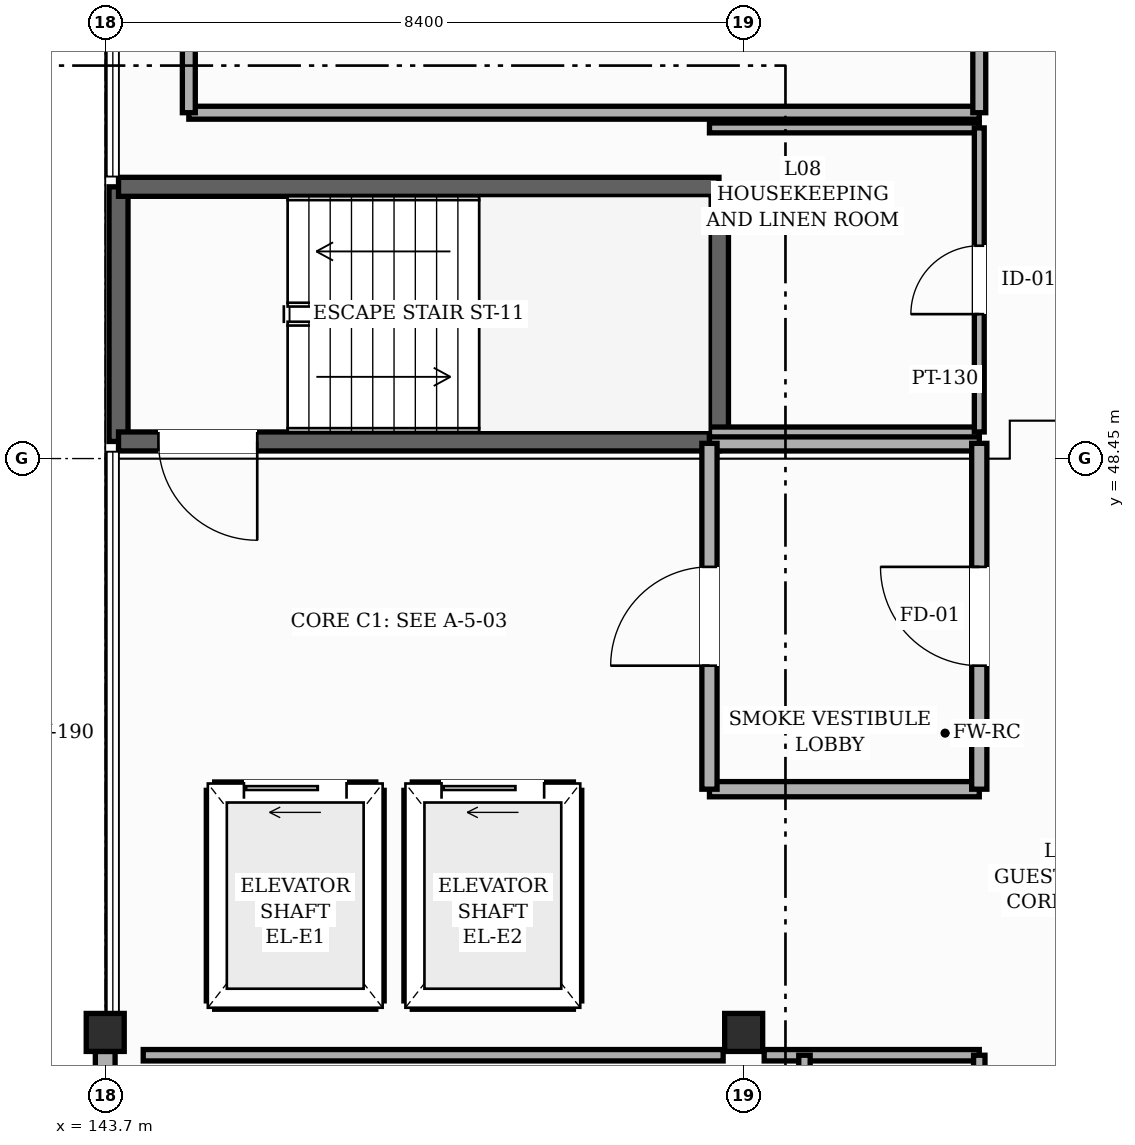
"""IFC4 building model, lengths in metres.
Left out: names, types, materials, properties, quantities, classifications, styles, units other than length and angle.
Written with IfcOpenShell. Run it as: python <this file> out.ifc"""

import sys

from ifc_helpers import new_model, si_unit, direction, frame, frame_2d, origin, origin_2d, place, context, subcontext, project, spatial, rectangle, hollow_rectangle, extrude, element, fill, save


model = new_model("IFC4")
c1 = context("Model", 3, precision=1e-05, world=origin(), true_north=direction((0.0, 1.0)))
c2 = subcontext(c1, "Body", "Model", "MODEL_VIEW")
j1 = project(units=[si_unit("LENGTHUNIT", "METRE"), si_unit("PLANEANGLEUNIT", "RADIAN")], contexts=[c1])
p1 = place(None, origin())
s1 = spatial("IfcSite", under=j1, at=p1, CompositionType="ELEMENT")
p2 = place(p1, origin())
s2 = spatial("IfcBuilding", under=s1, at=p2, CompositionType="ELEMENT")
p3 = place(p2, frame((0.0, 0.0, 35.4)))
s3 = spatial("IfcBuildingStorey", under=s2, at=p3, CompositionType="ELEMENT", Elevation=35.4)
for number, where, z_axis, x_axis in (
    (1, (143.7, 40.9, 0.0), (0.0, 0.0, 1.0), (1.0, 0.0, 0.0)),
    (2, (152.1, 40.9, 0.0), (0.0, 0.0, 1.0), (1.0, 0.0, 0.0)),
):
    element("IfcColumn", number, at=place(p3, frame(where, z_axis=z_axis, x_axis=x_axis)), inside=s3, PredefinedType="COLUMN", context=c2, shape_type="SweptSolid", body=[
        extrude(hollow_rectangle(XDim=0.5, YDim=0.5, WallThickness=0.022, InnerFilletRadius=0.022, OuterFilletRadius=0.044, at=origin_2d()), origin(), (0.0, 0.0, 1.0), 3.6),
    ])
p4 = place(p3, frame((143.7, 32.25, 0.0), z_axis=(0.0, 0.0, 1.0), x_axis=(0.0, 1.0, 0.0)))
e3 = element("IfcWall", 3, at=p4, inside=s3, PredefinedType="SOLIDWALL", context=c2, shape_type="SweptSolid", body=[
    extrude(rectangle(XDim=8.4, YDim=0.26, at=frame_2d((4.2, 0.0))), origin(), (0.0, 0.0, 1.0), 2.655),
])
p5 = place(p4, frame((1.05, 0.0, 0.85)))
e4 = element("IfcOpeningElement", 4, at=p5, cuts=e3, PredefinedType="OPENING", context=c2, shape_type="SweptSolid", body=[
    extrude(rectangle(XDim=1.85, YDim=1.35, at=frame_2d((0.925, 0.675))), frame((0.0, 0.14, 0.0), z_axis=(0.0, -1.0, 0.0), x_axis=(1.0, 0.0, 0.0)), (0.0, 0.0, 1.0), 0.28),
])
p6 = place(p4, frame((3.475, 0.0, 0.85)))
e5 = element("IfcOpeningElement", 5, at=p6, cuts=e3, PredefinedType="OPENING", context=c2, shape_type="SweptSolid", body=[
    extrude(rectangle(XDim=2.1, YDim=1.35, at=frame_2d((1.05, 0.675))), frame((0.0, 0.14, 0.0), z_axis=(0.0, -1.0, 0.0), x_axis=(1.0, 0.0, 0.0)), (0.0, 0.0, 1.0), 0.28),
])
p7 = place(p4, frame((6.5, 0.0, 0.85)))
e6 = element("IfcOpeningElement", 6, at=p7, cuts=e3, PredefinedType="OPENING", context=c2, shape_type="SweptSolid", body=[
    extrude(rectangle(XDim=1.15, YDim=1.35, at=frame_2d((0.575, 0.675))), frame((0.0, 0.14, 0.0), z_axis=(0.0, -1.0, 0.0), x_axis=(1.0, 0.0, 0.0)), (0.0, 0.0, 1.0), 0.28),
])
for number, where, z_axis, x_axis in (
    (7, (143.875, 48.675, 0.0), (0.0, 0.0, 1.0), (0.0, 1.0, 0.0)),
    (8, (151.775, 52.025, 0.0), (0.0, 0.0, 1.0), (0.0, -1.0, 0.0)),
):
    element("IfcWall", number, at=place(p3, frame(where, z_axis=z_axis, x_axis=x_axis)), inside=s3, PredefinedType="SHEAR", context=c2, shape_type="SweptSolid", body=[
        extrude(rectangle(XDim=3.35, YDim=0.25, at=frame_2d((1.675, 0.0))), origin(), (0.0, 0.0, 1.0), 3.38),
    ])
p8 = place(p3, frame((151.775, 48.675, 0.0), z_axis=(0.0, 0.0, 1.0), x_axis=(-1.0, 0.0, 0.0)))
e9 = element("IfcWall", 9, at=p8, inside=s3, PredefinedType="SHEAR", context=c2, shape_type="SweptSolid", body=[
    extrude(rectangle(XDim=7.9, YDim=0.25, at=frame_2d((3.95, 0.0))), origin(), (0.0, 0.0, 1.0), 3.38),
])
p9 = place(p8, frame((6.075, 0.0, 0.0)))
e10 = element("IfcOpeningElement", 10, at=p9, cuts=e9, PredefinedType="OPENING", context=c2, shape_type="SweptSolid", body=[
    extrude(rectangle(XDim=1.3, YDim=2.2, at=frame_2d((0.65, 1.1))), frame((0.0, 0.135, 0.0), z_axis=(0.0, -1.0, 0.0), x_axis=(1.0, 0.0, 0.0)), (0.0, 0.0, 1.0), 0.27),
])
p10 = place(p3, frame((143.875, 52.025, 0.0), z_axis=(0.0, 0.0, 1.0), x_axis=(1.0, 0.0, 0.0)))
e11 = element("IfcWall", 11, at=p10, inside=s3, PredefinedType="SHEAR", context=c2, shape_type="SweptSolid", body=[
    extrude(rectangle(XDim=7.9, YDim=0.25, at=frame_2d((3.95, 0.0))), origin(), (0.0, 0.0, 1.0), 3.38),
])
p11 = place(p3, frame((145.14, 44.085, 0.0), z_axis=(0.0, 0.0, 1.0), x_axis=(1.0, 0.0, 0.0)))
e12 = element("IfcWall", 12, at=p11, inside=s3, PredefinedType="SHEAR", context=c2, shape_type="SweptSolid", body=[
    extrude(rectangle(XDim=2.12, YDim=0.22, at=frame_2d((1.06, 0.0))), origin(), (0.0, 0.0, 1.0), 3.38),
])
p12 = place(p11, frame((0.385, 0.0, 0.0)))
e13 = element("IfcOpeningElement", 13, at=p12, cuts=e12, PredefinedType="OPENING", context=c2, shape_type="SweptSolid", body=[
    extrude(rectangle(XDim=1.35, YDim=2.3, at=frame_2d((0.675, 1.15))), frame((0.0, 0.12, 0.0), z_axis=(0.0, -1.0, 0.0), x_axis=(1.0, 0.0, 0.0)), (0.0, 0.0, 1.0), 0.24),
])
p13 = place(p3, frame((145.14, 41.315, 0.0), z_axis=(0.0, 0.0, 1.0), x_axis=(1.0, 0.0, 0.0)))
e14 = element("IfcWall", 14, at=p13, inside=s3, PredefinedType="SHEAR", context=c2, shape_type="SweptSolid", body=[
    extrude(rectangle(XDim=2.12, YDim=0.22, at=frame_2d((1.06, 0.0))), origin(), (0.0, 0.0, 1.0), 3.38),
])
for number, where, z_axis, x_axis in (
    (15, (147.26, 41.315, 0.0), (0.0, 0.0, 1.0), (0.0, 1.0, 0.0)),
    (16, (145.14, 41.315, 0.0), (0.0, 0.0, 1.0), (0.0, 1.0, 0.0)),
):
    element("IfcWall", number, at=place(p3, frame(where, z_axis=z_axis, x_axis=x_axis)), inside=s3, PredefinedType="SHEAR", context=c2, shape_type="SweptSolid", body=[
        extrude(rectangle(XDim=2.77, YDim=0.22, at=frame_2d((1.385, 0.0))), origin(), (0.0, 0.0, 1.0), 3.38),
    ])
p14 = place(p3, frame((147.74, 44.085, 0.0), z_axis=(0.0, 0.0, 1.0), x_axis=(1.0, 0.0, 0.0)))
e17 = element("IfcWall", 17, at=p14, inside=s3, PredefinedType="SHEAR", context=c2, shape_type="SweptSolid", body=[
    extrude(rectangle(XDim=2.12, YDim=0.22, at=frame_2d((1.06, 0.0))), origin(), (0.0, 0.0, 1.0), 3.38),
])
p15 = place(p14, frame((0.385, 0.0, 0.0)))
e18 = element("IfcOpeningElement", 18, at=p15, cuts=e17, PredefinedType="OPENING", context=c2, shape_type="SweptSolid", body=[
    extrude(rectangle(XDim=1.35, YDim=2.3, at=frame_2d((0.675, 1.15))), frame((0.0, 0.12, 0.0), z_axis=(0.0, -1.0, 0.0), x_axis=(1.0, 0.0, 0.0)), (0.0, 0.0, 1.0), 0.24),
])
p16 = place(p3, frame((147.74, 41.315, 0.0), z_axis=(0.0, 0.0, 1.0), x_axis=(1.0, 0.0, 0.0)))
e19 = element("IfcWall", 19, at=p16, inside=s3, PredefinedType="SHEAR", context=c2, shape_type="SweptSolid", body=[
    extrude(rectangle(XDim=2.12, YDim=0.22, at=frame_2d((1.06, 0.0))), origin(), (0.0, 0.0, 1.0), 3.38),
])
for number, where, z_axis, x_axis in (
    (20, (149.86, 41.315, 0.0), (0.0, 0.0, 1.0), (0.0, 1.0, 0.0)),
    (21, (147.74, 41.315, 0.0), (0.0, 0.0, 1.0), (0.0, 1.0, 0.0)),
):
    element("IfcWall", number, at=place(p3, frame(where, z_axis=z_axis, x_axis=x_axis)), inside=s3, PredefinedType="SHEAR", context=c2, shape_type="SweptSolid", body=[
        extrude(rectangle(XDim=2.77, YDim=0.22, at=frame_2d((1.385, 0.0))), origin(), (0.0, 0.0, 1.0), 3.38),
    ])
p17 = place(p3, frame((144.2, 40.6, 0.0), z_axis=(0.0, 0.0, 1.0), x_axis=(1.0, 0.0, 0.0)))
e22 = element("IfcWall", 22, at=p17, inside=s3, PredefinedType="PARTITIONING", context=c2, shape_type="SweptSolid", body=[
    extrude(rectangle(XDim=7.63, YDim=0.15, at=frame_2d((3.815, 0.0))), origin(), (0.0, 0.0, 1.0), 2.755),
])
p18 = place(p3, frame((152.37, 40.6, 0.0), z_axis=(0.0, 0.0, 1.0), x_axis=(1.0, 0.0, 0.0)))
e23 = element("IfcWall", 23, at=p18, inside=s3, PredefinedType="PARTITIONING", context=c2, shape_type="SweptSolid", body=[
    extrude(rectangle(XDim=2.83, YDim=0.15, at=frame_2d((1.415, 0.0))), origin(), (0.0, 0.0, 1.0), 2.755),
])
for number, where, z_axis, x_axis in (
    (24, (151.65, 44.1, 0.0), (0.0, 0.0, 1.0), (1.0, 0.0, 0.0)),
    (25, (151.65, 48.65, 0.0), (0.0, 0.0, 1.0), (1.0, 0.0, 0.0)),
):
    element("IfcWall", number, at=place(p3, frame(where, z_axis=z_axis, x_axis=x_axis)), inside=s3, PredefinedType="SOLIDWALL", context=c2, shape_type="SweptSolid", body=[
        extrude(rectangle(XDim=3.55, YDim=0.2, at=frame_2d((1.775, 0.0))), origin(), (0.0, 0.0, 1.0), 3.365),
    ])
for number, where, z_axis, x_axis in (
    (26, (151.65, 48.8, 0.0), (0.0, 0.0, 1.0), (1.0, 0.0, 0.0)),
    (27, (151.65, 52.8, 0.0), (0.0, 0.0, 1.0), (1.0, 0.0, 0.0)),
):
    element("IfcWall", number, at=place(p3, frame(where, z_axis=z_axis, x_axis=x_axis)), inside=s3, PredefinedType="PARTITIONING", context=c2, shape_type="SweptSolid", body=[
        extrude(rectangle(XDim=3.55, YDim=0.13, at=frame_2d((1.775, 0.0))), origin(), (0.0, 0.0, 1.0), 3.365),
    ])
p19 = place(p3, frame((144.8, 53.0, 0.0), z_axis=(0.0, 0.0, 1.0), x_axis=(1.0, 0.0, 0.0)))
e28 = element("IfcWall", 28, at=p19, inside=s3, PredefinedType="PARTITIONING", context=c2, shape_type="SweptSolid", body=[
    extrude(rectangle(XDim=10.4, YDim=0.17, at=frame_2d((5.2, 0.0))), origin(), (0.0, 0.0, 1.0), 3.365),
])
p20 = place(p3, frame((144.8, 53.0, 0.0), z_axis=(0.0, 0.0, 1.0), x_axis=(0.0, 1.0, 0.0)))
e29 = element("IfcWall", 29, at=p20, inside=s3, PredefinedType="PARTITIONING", context=c2, shape_type="SweptSolid", body=[
    extrude(rectangle(XDim=6.45, YDim=0.17, at=frame_2d((3.225, 0.0))), origin(), (0.0, 0.0, 1.0), 3.365),
])
p21 = place(p3, frame((151.65, 44.1, 0.0), z_axis=(0.0, 0.0, 1.0), x_axis=(0.0, 1.0, 0.0)))
e30 = element("IfcWall", 30, at=p21, inside=s3, PredefinedType="SOLIDWALL", context=c2, shape_type="SweptSolid", body=[
    extrude(rectangle(XDim=4.55, YDim=0.2, at=frame_2d((2.275, 0.0))), origin(), (0.0, 0.0, 1.0), 3.365),
])
p22 = place(p21, frame((1.625, 0.0, 0.0)))
e31 = element("IfcOpeningElement", 31, at=p22, cuts=e30, PredefinedType="OPENING", context=c2, shape_type="SweptSolid", body=[
    extrude(rectangle(XDim=1.3, YDim=2.2, at=frame_2d((0.65, 1.1))), frame((0.0, 0.11, 0.0), z_axis=(0.0, -1.0, 0.0), x_axis=(1.0, 0.0, 0.0)), (0.0, 0.0, 1.0), 0.22),
])
p23 = place(p3, frame((152.9, 39.5, 0.0), z_axis=(0.0, 0.0, 1.0), x_axis=(0.0, 1.0, 0.0)))
e32 = element("IfcWall", 32, at=p23, inside=s3, PredefinedType="PARTITIONING", context=c2, shape_type="SweptSolid", body=[
    extrude(rectangle(XDim=1.1, YDim=0.15, at=frame_2d((0.55, 0.0))), origin(), (0.0, 0.0, 1.0), 3.365),
])
p24 = place(p3, frame((155.2, 30.4, 0.0), z_axis=(0.0, 0.0, 1.0), x_axis=(0.0, 1.0, 0.0)))
e33 = element("IfcWall", 33, at=p24, inside=s3, PredefinedType="PARTITIONING", context=c2, shape_type="SweptSolid", body=[
    extrude(rectangle(XDim=10.2, YDim=0.15, at=frame_2d((5.1, 0.0))), origin(), (0.0, 0.0, 1.0), 3.365),
])
p25 = place(p24, frame((0.175, 0.0, 0.0)))
e34 = element("IfcOpeningElement", 34, at=p25, cuts=e33, PredefinedType="OPENING", context=c2, shape_type="SweptSolid", body=[
    extrude(rectangle(XDim=1.1, YDim=2.2, at=frame_2d((0.55, 1.1))), frame((0.0, 0.085, 0.0), z_axis=(0.0, -1.0, 0.0), x_axis=(1.0, 0.0, 0.0)), (0.0, 0.0, 1.0), 0.17),
])
p26 = place(p24, frame((2.8, 0.0, 0.0)))
e35 = element("IfcOpeningElement", 35, at=p26, cuts=e33, PredefinedType="OPENING", context=c2, shape_type="SweptSolid", body=[
    extrude(rectangle(XDim=0.95, YDim=2.15, at=frame_2d((0.475, 1.075))), frame((0.0, 0.085, 0.0), z_axis=(0.0, -1.0, 0.0), x_axis=(1.0, 0.0, 0.0)), (0.0, 0.0, 1.0), 0.17),
])
p27 = place(p24, frame((5.35, 0.0, 0.0)))
e36 = element("IfcOpeningElement", 36, at=p27, cuts=e33, PredefinedType="OPENING", context=c2, shape_type="SweptSolid", body=[
    extrude(rectangle(XDim=0.95, YDim=2.15, at=frame_2d((0.475, 1.075))), frame((0.0, 0.085, 0.0), z_axis=(0.0, -1.0, 0.0), x_axis=(1.0, 0.0, 0.0)), (0.0, 0.0, 1.0), 0.17),
])
p28 = place(p24, frame((7.9, 0.0, 0.0)))
e37 = element("IfcOpeningElement", 37, at=p28, cuts=e33, PredefinedType="OPENING", context=c2, shape_type="SweptSolid", body=[
    extrude(rectangle(XDim=0.95, YDim=2.15, at=frame_2d((0.475, 1.075))), frame((0.0, 0.085, 0.0), z_axis=(0.0, -1.0, 0.0), x_axis=(1.0, 0.0, 0.0)), (0.0, 0.0, 1.0), 0.17),
])
p29 = place(p3, frame((155.2, 44.1, 0.0), z_axis=(0.0, 0.0, 1.0), x_axis=(0.0, 1.0, 0.0)))
e38 = element("IfcWall", 38, at=p29, inside=s3, PredefinedType="SOLIDWALL", context=c2, shape_type="SweptSolid", body=[
    extrude(rectangle(XDim=4.55, YDim=0.2, at=frame_2d((2.275, 0.0))), origin(), (0.0, 0.0, 1.0), 3.365),
])
p30 = place(p29, frame((1.625, 0.0, 0.0)))
e39 = element("IfcOpeningElement", 39, at=p30, cuts=e38, PredefinedType="OPENING", context=c2, shape_type="SweptSolid", body=[
    extrude(rectangle(XDim=1.3, YDim=2.2, at=frame_2d((0.65, 1.1))), frame((0.0, 0.11, 0.0), z_axis=(0.0, -1.0, 0.0), x_axis=(1.0, 0.0, 0.0)), (0.0, 0.0, 1.0), 0.22),
])
p31 = place(p3, frame((155.2, 48.8, 0.0), z_axis=(0.0, 0.0, 1.0), x_axis=(0.0, 1.0, 0.0)))
e40 = element("IfcWall", 40, at=p31, inside=s3, PredefinedType="PARTITIONING", context=c2, shape_type="SweptSolid", body=[
    extrude(rectangle(XDim=4.0, YDim=0.13, at=frame_2d((2.0, 0.0))), origin(), (0.0, 0.0, 1.0), 3.365),
])
p32 = place(p31, frame((1.55, 0.0, 0.0)))
e41 = element("IfcOpeningElement", 41, at=p32, cuts=e40, PredefinedType="OPENING", context=c2, shape_type="SweptSolid", body=[
    extrude(rectangle(XDim=0.9, YDim=2.15, at=frame_2d((0.45, 1.075))), frame((0.0, 0.075, 0.0), z_axis=(0.0, -1.0, 0.0), x_axis=(1.0, 0.0, 0.0)), (0.0, 0.0, 1.0), 0.15),
])
p33 = place(p3, frame((155.2, 53.0, 0.0), z_axis=(0.0, 0.0, 1.0), x_axis=(0.0, 1.0, 0.0)))
e42 = element("IfcWall", 42, at=p33, inside=s3, PredefinedType="PARTITIONING", context=c2, shape_type="SweptSolid", body=[
    extrude(rectangle(XDim=6.45, YDim=0.17, at=frame_2d((3.225, 0.0))), origin(), (0.0, 0.0, 1.0), 3.365),
])
p34 = place(p33, frame((2.625, 0.0, 0.0)))
e43 = element("IfcOpeningElement", 43, at=p34, cuts=e42, PredefinedType="OPENING", context=c2, shape_type="SweptSolid", body=[
    extrude(rectangle(XDim=1.2, YDim=2.2, at=frame_2d((0.6, 1.1))), frame((0.0, 0.095, 0.0), z_axis=(0.0, -1.0, 0.0), x_axis=(1.0, 0.0, 0.0)), (0.0, 0.0, 1.0), 0.19),
])
p35 = place(p9, origin())
e44 = element("IfcDoor", 44, at=p35, inside=s3, OperationType="SINGLE_SWING_LEFT", PredefinedType="DOOR", context=c2, shape_type="SweptSolid", body=[
    extrude(rectangle(XDim=1.3, YDim=2.2, at=frame_2d((0.65, 1.1))), frame((0.0, 0.025, 0.0), z_axis=(0.0, -1.0, 0.0), x_axis=(1.0, 0.0, 0.0)), (0.0, 0.0, 1.0), 0.05),
])
fill(e10, e44)
p36 = place(p12, origin())
e45 = element("IfcDoor", 45, at=p36, inside=s3, OperationType="SLIDING_TO_LEFT", PredefinedType="DOOR", context=c2, shape_type="SweptSolid", body=[
    extrude(rectangle(XDim=1.35, YDim=2.3, at=frame_2d((0.675, 1.15))), frame((0.0, 0.025, 0.0), z_axis=(0.0, -1.0, 0.0), x_axis=(1.0, 0.0, 0.0)), (0.0, 0.0, 1.0), 0.05),
])
fill(e13, e45)
p37 = place(p15, origin())
e46 = element("IfcDoor", 46, at=p37, inside=s3, OperationType="SLIDING_TO_LEFT", PredefinedType="DOOR", context=c2, shape_type="SweptSolid", body=[
    extrude(rectangle(XDim=1.35, YDim=2.3, at=frame_2d((0.675, 1.15))), frame((0.0, 0.025, 0.0), z_axis=(0.0, -1.0, 0.0), x_axis=(1.0, 0.0, 0.0)), (0.0, 0.0, 1.0), 0.05),
])
fill(e18, e46)
p38 = place(p22, origin())
e47 = element("IfcDoor", 47, at=p38, inside=s3, OperationType="SINGLE_SWING_LEFT", PredefinedType="DOOR", context=c2, shape_type="SweptSolid", body=[
    extrude(rectangle(XDim=1.3, YDim=2.2, at=frame_2d((0.65, 1.1))), frame((0.0, 0.025, 0.0), z_axis=(0.0, -1.0, 0.0), x_axis=(1.0, 0.0, 0.0)), (0.0, 0.0, 1.0), 0.05),
])
fill(e31, e47)
p39 = place(p30, origin())
e48 = element("IfcDoor", 48, at=p39, inside=s3, OperationType="SINGLE_SWING_RIGHT", PredefinedType="DOOR", context=c2, shape_type="SweptSolid", body=[
    extrude(rectangle(XDim=1.3, YDim=2.2, at=frame_2d((0.65, 1.1))), frame((0.0, 0.025, 0.0), z_axis=(0.0, -1.0, 0.0), x_axis=(1.0, 0.0, 0.0)), (0.0, 0.0, 1.0), 0.05),
])
fill(e39, e48)
p40 = place(p32, origin())
e49 = element("IfcDoor", 49, at=p40, inside=s3, OperationType="SINGLE_SWING_LEFT", PredefinedType="DOOR", context=c2, shape_type="SweptSolid", body=[
    extrude(rectangle(XDim=0.9, YDim=2.15, at=frame_2d((0.45, 1.075))), frame((0.0, 0.025, 0.0), z_axis=(0.0, -1.0, 0.0), x_axis=(1.0, 0.0, 0.0)), (0.0, 0.0, 1.0), 0.05),
])
fill(e41, e49)
save(model, sys.argv[1])
